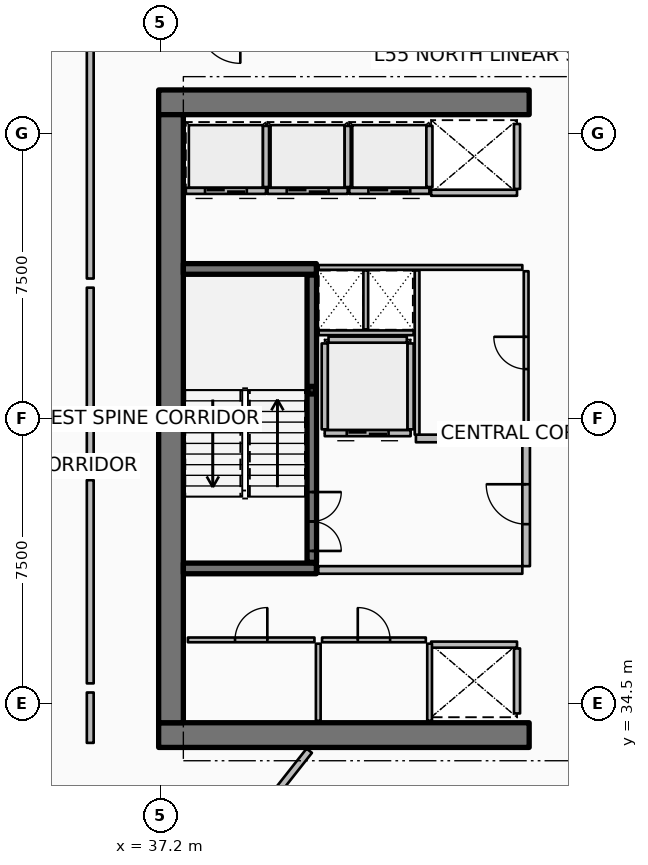
"""IFC4 building model, lengths in metres.
Left out: names, types, materials, properties, quantities, classifications, styles, units other than length and angle.
Written with IfcOpenShell. Run it as: python <this file> out.ifc"""

import sys

from ifc_helpers import new_model, si_unit, direction, frame, frame_2d, origin, origin_2d, place, context, subcontext, project, spatial, rectangle, hollow_rectangle, extrude, element, fill, save


model = new_model("IFC4")
c1 = context("Model", 3, precision=1e-05, world=origin(), true_north=direction((0.0, 1.0)))
c2 = subcontext(c1, "Body", "Model", "MODEL_VIEW")
j1 = project(units=[si_unit("LENGTHUNIT", "METRE"), si_unit("PLANEANGLEUNIT", "RADIAN")], contexts=[c1])
p1 = place(None, origin())
s1 = spatial("IfcSite", under=j1, at=p1, CompositionType="ELEMENT")
p2 = place(p1, origin())
s2 = spatial("IfcBuilding", under=s1, at=p2, CompositionType="ELEMENT")
p3 = place(p2, frame((0.0, 0.0, 217.8)))
s3 = spatial("IfcBuildingStorey", under=s2, at=p3, CompositionType="ELEMENT", Elevation=217.8)
for number, where, z_axis, x_axis in (
    (1, (37.15, 33.675, 0.0), (0.0, 0.0, 1.0), (1.0, 0.0, 0.0)),
    (2, (37.15, 50.325, 0.0), (0.0, 0.0, 1.0), (1.0, 0.0, 0.0)),
):
    element("IfcWall", number, at=place(p3, frame(where, z_axis=z_axis, x_axis=x_axis)), inside=s3, PredefinedType="SHEAR", context=c2, shape_type="SweptSolid", body=[
        extrude(rectangle(XDim=9.75, YDim=0.65, at=frame_2d((4.875, 0.0))), origin(), (0.0, 0.0, 1.0), 3.75),
    ])
p4 = place(p3, frame((37.475, 34.0, 0.0), z_axis=(0.0, 0.0, 1.0), x_axis=(0.0, 1.0, 0.0)))
e3 = element("IfcWall", 3, at=p4, inside=s3, PredefinedType="SHEAR", context=c2, shape_type="SweptSolid", body=[
    extrude(rectangle(XDim=16.0, YDim=0.65, at=frame_2d((8.0, 0.0))), origin(), (0.0, 0.0, 1.0), 3.75),
])
for number, where, z_axis, x_axis in (
    (4, (37.8, 38.06, 0.0), (0.0, 0.0, 1.0), (1.0, 0.0, 0.0)),
    (5, (37.8, 45.94, 0.0), (0.0, 0.0, 1.0), (1.0, 0.0, 0.0)),
):
    element("IfcWall", number, at=place(p3, frame(where, z_axis=z_axis, x_axis=x_axis)), inside=s3, PredefinedType="SHEAR", context=c2, shape_type="SweptSolid", body=[
        extrude(rectangle(XDim=3.5, YDim=0.28, at=frame_2d((1.75, 0.0))), origin(), (0.0, 0.0, 1.0), 3.75),
    ])
p5 = place(p3, frame((41.18, 42.75, 0.0), z_axis=(0.0, 0.0, 1.0), x_axis=(1.0, 0.0, 0.0)))
e6 = element("IfcColumn", 6, at=p5, inside=s3, PredefinedType="COLUMN", context=c2, shape_type="SweptSolid", body=[
    extrude(hollow_rectangle(XDim=0.2, YDim=0.2, WallThickness=0.01, InnerFilletRadius=0.01, OuterFilletRadius=0.02, at=origin_2d()), origin(), (0.0, 0.0, 1.0), 1.67),
])
p6 = place(p3, frame((41.18, 38.22, 0.0), z_axis=(0.0, 0.0, 1.0), x_axis=(0.0, 1.0, 0.0)))
e7 = element("IfcWall", 7, at=p6, inside=s3, PredefinedType="SOLIDWALL", context=c2, shape_type="SweptSolid", body=[
    extrude(rectangle(XDim=7.56, YDim=0.25, at=frame_2d((3.78, 0.0))), origin(), (0.0, 0.0, 1.0), 3.5),
])
p7 = place(p6, frame((0.3, 0.0, 0.0)))
e8 = element("IfcOpeningElement", 8, at=p7, cuts=e7, PredefinedType="OPENING", context=c2, shape_type="SweptSolid", body=[
    extrude(rectangle(XDim=1.55, YDim=2.15, at=frame_2d((0.775, 1.075))), frame((0.0, 0.135, 0.0), z_axis=(0.0, -1.0, 0.0), x_axis=(1.0, 0.0, 0.0)), (0.0, 0.0, 1.0), 0.27),
])
p8 = place(p3, frame((39.975, 47.995, 0.0), z_axis=(0.0, 0.0, 1.0), x_axis=(-1.0, 0.0, 0.0)))
e9 = element("IfcWall", 9, at=p8, inside=s3, PredefinedType="PARTITIONING", context=c2, shape_type="SweptSolid", body=[
    extrude(rectangle(XDim=2.11, YDim=0.16, at=frame_2d((1.055, 0.0))), origin(), (0.0, 0.0, 1.0), 3.5),
])
p9 = place(p8, frame((0.505, 0.0, 0.0)))
e10 = element("IfcOpeningElement", 10, at=p9, cuts=e9, PredefinedType="OPENING", context=c2, shape_type="SweptSolid", body=[
    extrude(rectangle(XDim=1.1, YDim=2.1, at=frame_2d((0.55, 1.05))), frame((0.0, 0.09, 0.0), z_axis=(0.0, -1.0, 0.0), x_axis=(1.0, 0.0, 0.0)), (0.0, 0.0, 1.0), 0.18),
])
p10 = place(p3, frame((39.975, 48.095, 0.0), z_axis=(0.0, 0.0, 1.0), x_axis=(0.0, 1.0, 0.0)))
e11 = element("IfcWall", 11, at=p10, inside=s3, PredefinedType="PARTITIONING", context=c2, shape_type="SweptSolid", body=[
    extrude(rectangle(XDim=1.61, YDim=0.16, at=frame_2d((0.805, 0.0))), origin(), (0.0, 0.0, 1.0), 3.5),
])
p11 = place(p3, frame((42.125, 47.995, 0.0), z_axis=(0.0, 0.0, 1.0), x_axis=(-1.0, 0.0, 0.0)))
e12 = element("IfcWall", 12, at=p11, inside=s3, PredefinedType="PARTITIONING", context=c2, shape_type="SweptSolid", body=[
    extrude(rectangle(XDim=2.11, YDim=0.16, at=frame_2d((1.055, 0.0))), origin(), (0.0, 0.0, 1.0), 3.5),
])
p12 = place(p11, frame((0.505, 0.0, 0.0)))
e13 = element("IfcOpeningElement", 13, at=p12, cuts=e12, PredefinedType="OPENING", context=c2, shape_type="SweptSolid", body=[
    extrude(rectangle(XDim=1.1, YDim=2.1, at=frame_2d((0.55, 1.05))), frame((0.0, 0.09, 0.0), z_axis=(0.0, -1.0, 0.0), x_axis=(1.0, 0.0, 0.0)), (0.0, 0.0, 1.0), 0.18),
])
p13 = place(p3, frame((42.125, 48.095, 0.0), z_axis=(0.0, 0.0, 1.0), x_axis=(0.0, 1.0, 0.0)))
e14 = element("IfcWall", 14, at=p13, inside=s3, PredefinedType="PARTITIONING", context=c2, shape_type="SweptSolid", body=[
    extrude(rectangle(XDim=1.61, YDim=0.16, at=frame_2d((0.805, 0.0))), origin(), (0.0, 0.0, 1.0), 3.5),
])
p14 = place(p3, frame((44.275, 47.995, 0.0), z_axis=(0.0, 0.0, 1.0), x_axis=(-1.0, 0.0, 0.0)))
e15 = element("IfcWall", 15, at=p14, inside=s3, PredefinedType="PARTITIONING", context=c2, shape_type="SweptSolid", body=[
    extrude(rectangle(XDim=2.11, YDim=0.16, at=frame_2d((1.055, 0.0))), origin(), (0.0, 0.0, 1.0), 3.5),
])
p15 = place(p14, frame((0.505, 0.0, 0.0)))
e16 = element("IfcOpeningElement", 16, at=p15, cuts=e15, PredefinedType="OPENING", context=c2, shape_type="SweptSolid", body=[
    extrude(rectangle(XDim=1.1, YDim=2.1, at=frame_2d((0.55, 1.05))), frame((0.0, 0.09, 0.0), z_axis=(0.0, -1.0, 0.0), x_axis=(1.0, 0.0, 0.0)), (0.0, 0.0, 1.0), 0.18),
])
p16 = place(p3, frame((44.275, 48.095, 0.0), z_axis=(0.0, 0.0, 1.0), x_axis=(0.0, 1.0, 0.0)))
e17 = element("IfcWall", 17, at=p16, inside=s3, PredefinedType="PARTITIONING", context=c2, shape_type="SweptSolid", body=[
    extrude(rectangle(XDim=1.61, YDim=0.16, at=frame_2d((0.805, 0.0))), origin(), (0.0, 0.0, 1.0), 3.5),
])
p17 = place(p3, frame((46.58, 47.945, 0.0), z_axis=(0.0, 0.0, 1.0), x_axis=(-1.0, 0.0, 0.0)))
e18 = element("IfcWall", 18, at=p17, inside=s3, PredefinedType="PARTITIONING", context=c2, shape_type="SweptSolid", body=[
    extrude(rectangle(XDim=2.26, YDim=0.16, at=frame_2d((1.13, 0.0))), origin(), (0.0, 0.0, 1.0), 3.5),
])
p18 = place(p3, frame((46.58, 48.045, 0.0), z_axis=(0.0, 0.0, 1.0), x_axis=(0.0, 1.0, 0.0)))
e19 = element("IfcWall", 19, at=p18, inside=s3, PredefinedType="PARTITIONING", context=c2, shape_type="SweptSolid", body=[
    extrude(rectangle(XDim=1.71, YDim=0.16, at=frame_2d((0.855, 0.0))), origin(), (0.0, 0.0, 1.0), 3.5),
])
p19 = place(p3, frame((44.32, 36.055, 0.0), z_axis=(0.0, 0.0, 1.0), x_axis=(1.0, 0.0, 0.0)))
e20 = element("IfcWall", 20, at=p19, inside=s3, PredefinedType="PARTITIONING", context=c2, shape_type="SweptSolid", body=[
    extrude(rectangle(XDim=2.26, YDim=0.16, at=frame_2d((1.13, 0.0))), origin(), (0.0, 0.0, 1.0), 3.5),
])
p20 = place(p3, frame((46.58, 34.245, 0.0), z_axis=(0.0, 0.0, 1.0), x_axis=(0.0, 1.0, 0.0)))
e21 = element("IfcWall", 21, at=p20, inside=s3, PredefinedType="PARTITIONING", context=c2, shape_type="SweptSolid", body=[
    extrude(rectangle(XDim=1.71, YDim=0.16, at=frame_2d((0.855, 0.0))), origin(), (0.0, 0.0, 1.0), 3.5),
])
p21 = place(p3, frame((43.78, 41.62, 0.0), z_axis=(0.0, 0.0, 1.0), x_axis=(-1.0, 0.0, 0.0)))
e22 = element("IfcWall", 22, at=p21, inside=s3, PredefinedType="PARTITIONING", context=c2, shape_type="SweptSolid", body=[
    extrude(rectangle(XDim=2.26, YDim=0.16, at=frame_2d((1.13, 0.0))), origin(), (0.0, 0.0, 1.0), 3.5),
])
p22 = place(p21, frame((0.58, 0.0, 0.0)))
e23 = element("IfcOpeningElement", 23, at=p22, cuts=e22, PredefinedType="OPENING", context=c2, shape_type="SweptSolid", body=[
    extrude(rectangle(XDim=1.1, YDim=2.1, at=frame_2d((0.55, 1.05))), frame((0.0, 0.09, 0.0), z_axis=(0.0, -1.0, 0.0), x_axis=(1.0, 0.0, 0.0)), (0.0, 0.0, 1.0), 0.18),
])
for number, where, z_axis, x_axis in (
    (24, (43.78, 41.72, 0.0), (0.0, 0.0, 1.0), (0.0, 1.0, 0.0)),
    (25, (41.52, 41.72, 0.0), (0.0, 0.0, 1.0), (0.0, 1.0, 0.0)),
):
    element("IfcWall", number, at=place(p3, frame(where, z_axis=z_axis, x_axis=x_axis)), inside=s3, PredefinedType="PARTITIONING", context=c2, shape_type="SweptSolid", body=[
        extrude(rectangle(XDim=2.26, YDim=0.16, at=frame_2d((1.13, 0.0))), origin(), (0.0, 0.0, 1.0), 3.5),
    ])
p23 = place(p3, frame((41.62, 44.08, 0.0), z_axis=(0.0, 0.0, 1.0), x_axis=(1.0, 0.0, 0.0)))
e26 = element("IfcWall", 26, at=p23, inside=s3, PredefinedType="PARTITIONING", context=c2, shape_type="SweptSolid", body=[
    extrude(rectangle(XDim=2.06, YDim=0.16, at=frame_2d((1.03, 0.0))), origin(), (0.0, 0.0, 1.0), 3.5),
])
for number, where, z_axis, x_axis in (
    (27, (44.28, 34.05, 0.0), (0.0, 0.0, 1.0), (0.0, 1.0, 0.0)),
    (28, (41.35, 34.05, 0.0), (0.0, 0.0, 1.0), (0.0, 1.0, 0.0)),
):
    element("IfcWall", number, at=place(p3, frame(where, z_axis=z_axis, x_axis=x_axis)), inside=s3, PredefinedType="PARTITIONING", context=c2, shape_type="SweptSolid", body=[
        extrude(rectangle(XDim=2.03, YDim=0.125, at=frame_2d((1.015, 0.0))), origin(), (0.0, 0.0, 1.0), 2.94),
    ])
p24 = place(p3, frame((37.92, 36.18, 0.0), z_axis=(0.0, 0.0, 1.0), x_axis=(1.0, 0.0, 0.0)))
e29 = element("IfcWall", 29, at=p24, inside=s3, PredefinedType="PARTITIONING", context=c2, shape_type="SweptSolid", body=[
    extrude(rectangle(XDim=3.33, YDim=0.125, at=frame_2d((1.665, 0.0))), origin(), (0.0, 0.0, 1.0), 2.94),
])
p25 = place(p24, frame((1.24, 0.0, 0.0)))
e30 = element("IfcOpeningElement", 30, at=p25, cuts=e29, PredefinedType="OPENING", context=c2, shape_type="SweptSolid", body=[
    extrude(rectangle(XDim=0.85, YDim=2.06, at=frame_2d((0.425, 1.03))), frame((0.0, 0.073, 0.0), z_axis=(0.0, -1.0, 0.0), x_axis=(1.0, 0.0, 0.0)), (0.0, 0.0, 1.0), 0.145),
])
p26 = place(p3, frame((41.45, 36.18, 0.0), z_axis=(0.0, 0.0, 1.0), x_axis=(1.0, 0.0, 0.0)))
e31 = element("IfcWall", 31, at=p26, inside=s3, PredefinedType="PARTITIONING", context=c2, shape_type="SweptSolid", body=[
    extrude(rectangle(XDim=2.73, YDim=0.125, at=frame_2d((1.365, 0.0))), origin(), (0.0, 0.0, 1.0), 2.94),
])
p27 = place(p26, frame((0.94, 0.0, 0.0)))
e32 = element("IfcOpeningElement", 32, at=p27, cuts=e31, PredefinedType="OPENING", context=c2, shape_type="SweptSolid", body=[
    extrude(rectangle(XDim=0.85, YDim=2.06, at=frame_2d((0.425, 1.03))), frame((0.0, 0.073, 0.0), z_axis=(0.0, -1.0, 0.0), x_axis=(1.0, 0.0, 0.0)), (0.0, 0.0, 1.0), 0.145),
])
p28 = place(p3, frame((41.35, 38.02, 0.0), z_axis=(0.0, 0.0, 1.0), x_axis=(1.0, 0.0, 0.0)))
e33 = element("IfcWall", 33, at=p28, inside=s3, PredefinedType="PARTITIONING", context=c2, shape_type="SweptSolid", body=[
    extrude(rectangle(XDim=5.37, YDim=0.2, at=frame_2d((2.685, 0.0))), origin(), (0.0, 0.0, 1.0), 3.5),
])
p29 = place(p3, frame((43.92, 41.48, 0.0), z_axis=(0.0, 0.0, 1.0), x_axis=(1.0, 0.0, 0.0)))
e34 = element("IfcWall", 34, at=p29, inside=s3, PredefinedType="PARTITIONING", context=c2, shape_type="SweptSolid", body=[
    extrude(rectangle(XDim=2.8, YDim=0.2, at=frame_2d((1.4, 0.0))), origin(), (0.0, 0.0, 1.0), 3.5),
])
p30 = place(p3, frame((46.82, 38.12, 0.0), z_axis=(0.0, 0.0, 1.0), x_axis=(0.0, 1.0, 0.0)))
e35 = element("IfcWall", 35, at=p30, inside=s3, PredefinedType="PARTITIONING", context=c2, shape_type="SweptSolid", body=[
    extrude(rectangle(XDim=3.26, YDim=0.2, at=frame_2d((1.63, 0.0))), origin(), (0.0, 0.0, 1.0), 3.5),
])
p31 = place(p30, frame((1.105, 0.0, 0.0)))
e36 = element("IfcOpeningElement", 36, at=p31, cuts=e35, PredefinedType="OPENING", context=c2, shape_type="SweptSolid", body=[
    extrude(rectangle(XDim=1.05, YDim=2.1, at=frame_2d((0.525, 1.05))), frame((0.0, 0.11, 0.0), z_axis=(0.0, -1.0, 0.0), x_axis=(1.0, 0.0, 0.0)), (0.0, 0.0, 1.0), 0.22),
])
p32 = place(p3, frame((41.36, 45.98, 0.0), z_axis=(0.0, 0.0, 1.0), x_axis=(1.0, 0.0, 0.0)))
e37 = element("IfcWall", 37, at=p32, inside=s3, PredefinedType="PARTITIONING", context=c2, shape_type="SweptSolid", body=[
    extrude(rectangle(XDim=5.36, YDim=0.125, at=frame_2d((2.68, 0.0))), origin(), (0.0, 0.0, 1.0), 2.94),
])
p33 = place(p3, frame((41.36, 44.26, 0.0), z_axis=(0.0, 0.0, 1.0), x_axis=(1.0, 0.0, 0.0)))
e38 = element("IfcWall", 38, at=p33, inside=s3, PredefinedType="PARTITIONING", context=c2, shape_type="SweptSolid", body=[
    extrude(rectangle(XDim=2.5, YDim=0.125, at=frame_2d((1.25, 0.0))), origin(), (0.0, 0.0, 1.0), 2.94),
])
p34 = place(p3, frame((42.6, 44.35, 0.0), z_axis=(0.0, 0.0, 1.0), x_axis=(0.0, 1.0, 0.0)))
e39 = element("IfcWall", 39, at=p34, inside=s3, PredefinedType="PARTITIONING", context=c2, shape_type="SweptSolid", body=[
    extrude(rectangle(XDim=1.55, YDim=0.125, at=frame_2d((0.775, 0.0))), origin(), (0.0, 0.0, 1.0), 2.94),
])
p35 = place(p3, frame((43.95, 41.58, 0.0), z_axis=(0.0, 0.0, 1.0), x_axis=(0.0, 1.0, 0.0)))
e40 = element("IfcWall", 40, at=p35, inside=s3, PredefinedType="PARTITIONING", context=c2, shape_type="SweptSolid", body=[
    extrude(rectangle(XDim=4.32, YDim=0.125, at=frame_2d((2.16, 0.0))), origin(), (0.0, 0.0, 1.0), 2.94),
])
p36 = place(p3, frame((46.82, 41.58, 0.0), z_axis=(0.0, 0.0, 1.0), x_axis=(0.0, 1.0, 0.0)))
e41 = element("IfcWall", 41, at=p36, inside=s3, PredefinedType="PARTITIONING", context=c2, shape_type="SweptSolid", body=[
    extrude(rectangle(XDim=4.3, YDim=0.125, at=frame_2d((2.15, 0.0))), origin(), (0.0, 0.0, 1.0), 2.94),
])
p37 = place(p36, frame((1.725, 0.0, 0.0)))
e42 = element("IfcOpeningElement", 42, at=p37, cuts=e41, PredefinedType="OPENING", context=c2, shape_type="SweptSolid", body=[
    extrude(rectangle(XDim=0.85, YDim=2.06, at=frame_2d((0.425, 1.03))), frame((0.0, 0.073, 0.0), z_axis=(0.0, -1.0, 0.0), x_axis=(1.0, 0.0, 0.0)), (0.0, 0.0, 1.0), 0.145),
])
p38 = place(p3, frame((41.113, 33.264, 0.0), z_axis=(0.0, 0.0, 1.0), x_axis=(-0.619089233189, -0.785320648748, 0.0)))
e43 = element("IfcWall", 43, at=p38, inside=s3, PredefinedType="PARTITIONING", context=c2, shape_type="SweptSolid", body=[
    extrude(rectangle(XDim=16.006, YDim=0.18, at=frame_2d((8.003, 0.0))), origin(), (0.0, 0.0, 1.0), 2.94),
])
p39 = place(p3, frame((35.35, 51.853, 0.0), z_axis=(0.0, 0.0, 1.0), x_axis=(0.0, -1.0, 0.0)))
e44 = element("IfcWall", 44, at=p39, inside=s3, PredefinedType="PARTITIONING", context=c2, shape_type="SweptSolid", body=[
    extrude(rectangle(XDim=6.165, YDim=0.18, at=frame_2d((3.083, 0.0))), origin(), (0.0, 0.0, 1.0), 2.94),
])
p40 = place(p3, frame((35.35, 45.448, 0.0), z_axis=(0.0, 0.0, 1.0), x_axis=(0.0, -1.0, 0.0)))
e45 = element("IfcWall", 45, at=p40, inside=s3, PredefinedType="PARTITIONING", context=c2, shape_type="SweptSolid", body=[
    extrude(rectangle(XDim=4.825, YDim=0.18, at=frame_2d((2.413, 0.0))), origin(), (0.0, 0.0, 1.0), 2.94),
])
p41 = place(p3, frame((35.35, 40.383, 0.0), z_axis=(0.0, 0.0, 1.0), x_axis=(0.0, -1.0, 0.0)))
e46 = element("IfcWall", 46, at=p41, inside=s3, PredefinedType="PARTITIONING", context=c2, shape_type="SweptSolid", body=[
    extrude(rectangle(XDim=5.347, YDim=0.18, at=frame_2d((2.674, 0.0))), origin(), (0.0, 0.0, 1.0), 2.94),
])
p42 = place(p3, frame((35.35, 34.796, 0.0), z_axis=(0.0, 0.0, 1.0), x_axis=(0.0, -1.0, 0.0)))
e47 = element("IfcWall", 47, at=p42, inside=s3, PredefinedType="PARTITIONING", context=c2, shape_type="SweptSolid", body=[
    extrude(rectangle(XDim=1.326, YDim=0.18, at=frame_2d((0.663, 0.0))), origin(), (0.0, 0.0, 1.0), 2.94),
])
p43 = place(p7, origin())
e48 = element("IfcDoor", 48, at=p43, inside=s3, OperationType="DOUBLE_DOOR_SINGLE_SWING", PredefinedType="DOOR", context=c2, shape_type="SweptSolid", body=[
    extrude(rectangle(XDim=1.55, YDim=2.15, at=frame_2d((0.775, 1.075))), frame((0.0, 0.025, 0.0), z_axis=(0.0, -1.0, 0.0), x_axis=(1.0, 0.0, 0.0)), (0.0, 0.0, 1.0), 0.05),
])
fill(e8, e48)
p44 = place(p9, origin())
e49 = element("IfcDoor", 49, at=p44, inside=s3, OperationType="DOUBLE_DOOR_SLIDING", PredefinedType="DOOR", context=c2, shape_type="SweptSolid", body=[
    extrude(rectangle(XDim=1.1, YDim=2.1, at=frame_2d((0.55, 1.05))), frame((0.0, 0.025, 0.0), z_axis=(0.0, -1.0, 0.0), x_axis=(1.0, 0.0, 0.0)), (0.0, 0.0, 1.0), 0.05),
])
fill(e10, e49)
p45 = place(p12, origin())
e50 = element("IfcDoor", 50, at=p45, inside=s3, OperationType="DOUBLE_DOOR_SLIDING", PredefinedType="DOOR", context=c2, shape_type="SweptSolid", body=[
    extrude(rectangle(XDim=1.1, YDim=2.1, at=frame_2d((0.55, 1.05))), frame((0.0, 0.025, 0.0), z_axis=(0.0, -1.0, 0.0), x_axis=(1.0, 0.0, 0.0)), (0.0, 0.0, 1.0), 0.05),
])
fill(e13, e50)
p46 = place(p15, origin())
e51 = element("IfcDoor", 51, at=p46, inside=s3, OperationType="DOUBLE_DOOR_SLIDING", PredefinedType="DOOR", context=c2, shape_type="SweptSolid", body=[
    extrude(rectangle(XDim=1.1, YDim=2.1, at=frame_2d((0.55, 1.05))), frame((0.0, 0.025, 0.0), z_axis=(0.0, -1.0, 0.0), x_axis=(1.0, 0.0, 0.0)), (0.0, 0.0, 1.0), 0.05),
])
fill(e16, e51)
p47 = place(p22, origin())
e52 = element("IfcDoor", 52, at=p47, inside=s3, OperationType="DOUBLE_DOOR_SLIDING", PredefinedType="DOOR", context=c2, shape_type="SweptSolid", body=[
    extrude(rectangle(XDim=1.1, YDim=2.1, at=frame_2d((0.55, 1.05))), frame((0.0, 0.025, 0.0), z_axis=(0.0, -1.0, 0.0), x_axis=(1.0, 0.0, 0.0)), (0.0, 0.0, 1.0), 0.05),
])
fill(e23, e52)
p48 = place(p25, origin())
e53 = element("IfcDoor", 53, at=p48, inside=s3, OperationType="SINGLE_SWING_RIGHT", PredefinedType="DOOR", context=c2, shape_type="SweptSolid", body=[
    extrude(rectangle(XDim=0.85, YDim=2.06, at=frame_2d((0.425, 1.03))), frame((0.0, 0.025, 0.0), z_axis=(0.0, -1.0, 0.0), x_axis=(1.0, 0.0, 0.0)), (0.0, 0.0, 1.0), 0.05),
])
fill(e30, e53)
p49 = place(p27, origin())
e54 = element("IfcDoor", 54, at=p49, inside=s3, OperationType="SINGLE_SWING_LEFT", PredefinedType="DOOR", context=c2, shape_type="SweptSolid", body=[
    extrude(rectangle(XDim=0.85, YDim=2.06, at=frame_2d((0.425, 1.03))), frame((0.0, 0.025, 0.0), z_axis=(0.0, -1.0, 0.0), x_axis=(1.0, 0.0, 0.0)), (0.0, 0.0, 1.0), 0.05),
])
fill(e32, e54)
p50 = place(p31, origin())
e55 = element("IfcDoor", 55, at=p50, inside=s3, OperationType="SINGLE_SWING_RIGHT", PredefinedType="DOOR", context=c2, shape_type="SweptSolid", body=[
    extrude(rectangle(XDim=1.05, YDim=2.1, at=frame_2d((0.525, 1.05))), frame((0.0, 0.025, 0.0), z_axis=(0.0, -1.0, 0.0), x_axis=(1.0, 0.0, 0.0)), (0.0, 0.0, 1.0), 0.05),
])
fill(e36, e55)
p51 = place(p37, origin())
e56 = element("IfcDoor", 56, at=p51, inside=s3, OperationType="SINGLE_SWING_RIGHT", PredefinedType="DOOR", context=c2, shape_type="SweptSolid", body=[
    extrude(rectangle(XDim=0.85, YDim=2.06, at=frame_2d((0.425, 1.03))), frame((0.0, 0.025, 0.0), z_axis=(0.0, -1.0, 0.0), x_axis=(1.0, 0.0, 0.0)), (0.0, 0.0, 1.0), 0.05),
])
fill(e42, e56)
save(model, sys.argv[1])
